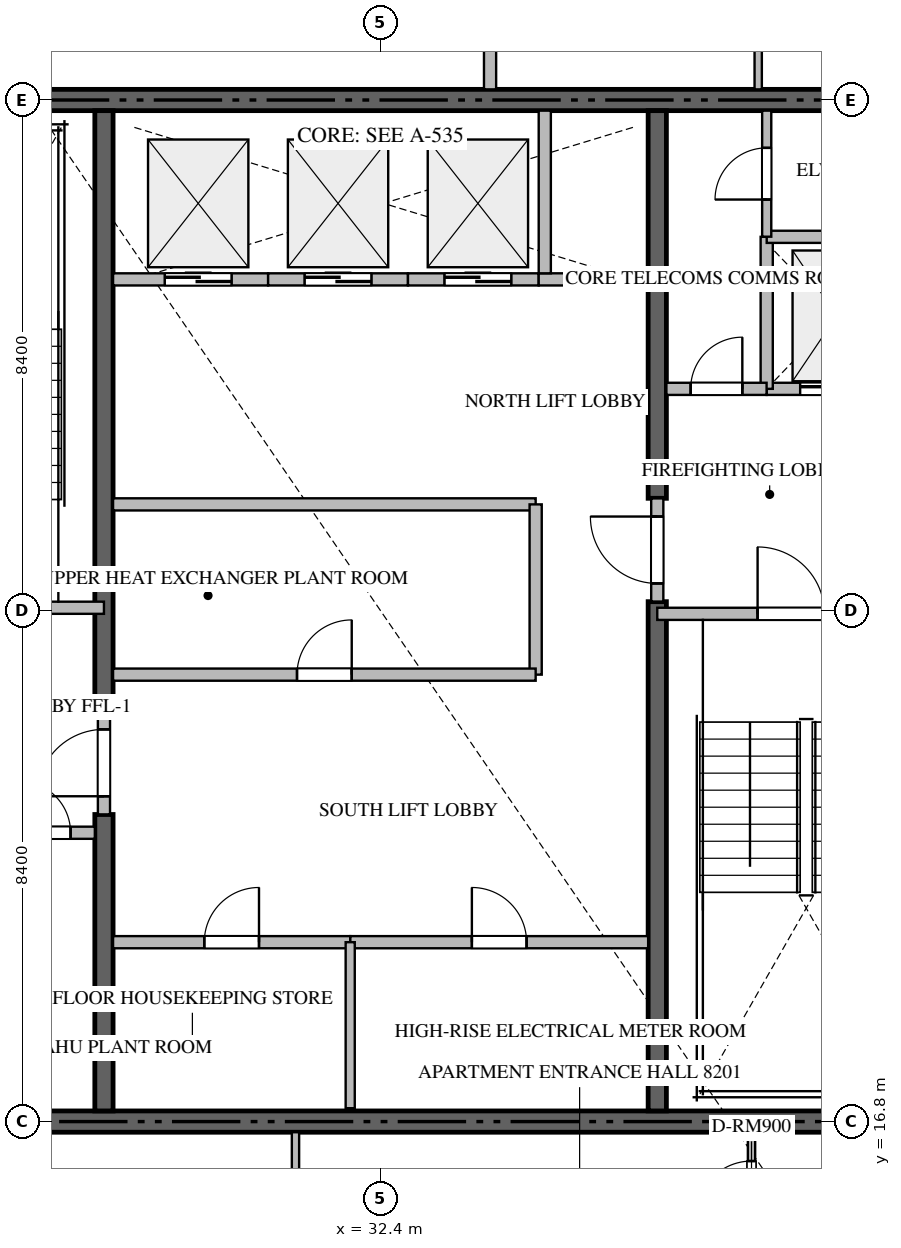
"""IFC4 building model, lengths in metres.
Left out: names, types, materials, properties, quantities, classifications, styles, units other than length and angle.
Written with IfcOpenShell. Run it as: python <this file> out.ifc"""

import sys

from ifc_helpers import new_model, si_unit, direction, frame, frame_2d, origin, place, context, subcontext, project, spatial, rectangle, extrude, source, transform, mapped, element, fill, save


model = new_model("IFC4")
c1 = context("Model", 3, precision=1e-05, world=origin(), true_north=direction((0.0, 1.0)))
c2 = subcontext(c1, "Body", "Model", "MODEL_VIEW")
j1 = project(units=[si_unit("LENGTHUNIT", "METRE"), si_unit("PLANEANGLEUNIT", "RADIAN")], contexts=[c1])
p1 = place(None, origin())
s1 = spatial("IfcSite", under=j1, at=p1, CompositionType="ELEMENT")
p2 = place(p1, origin())
s2 = spatial("IfcBuilding", under=s1, at=p2, CompositionType="ELEMENT")
p3 = place(p2, frame((0.0, 0.0, 329.9)))
s3 = spatial("IfcBuildingStorey", under=s2, at=p3, CompositionType="ELEMENT", Elevation=329.9)
for number, where, z_axis, x_axis in (
    (1, (23.4, 16.8, -0.26), (0.0, 0.0, 1.0), (1.0, 0.0, 0.0)),
    (2, (41.4, 33.6, -0.26), (0.0, 0.0, 1.0), (-1.0, 0.0, 0.0)),
):
    element("IfcWall", number, at=place(p3, frame(where, z_axis=z_axis, x_axis=x_axis)), inside=s3, PredefinedType="SHEAR", context=c2, shape_type="SweptSolid", body=[
        extrude(rectangle(XDim=18.0, YDim=0.35, at=frame_2d((9.0, 0.0))), origin(), (0.0, 0.0, 1.0), 4.048),
    ])
p4 = place(p3, frame((27.85, 16.975, -0.26), z_axis=(0.0, 0.0, 1.0), x_axis=(0.0, 1.0, 0.0)))
e3 = element("IfcWall", 3, at=p4, inside=s3, PredefinedType="SHEAR", context=c2, shape_type="SweptSolid", body=[
    extrude(rectangle(XDim=4.875, YDim=0.3, at=frame_2d((2.438, 0.0))), origin(), (0.0, 0.0, 1.0), 4.048),
])
p5 = place(p3, frame((27.85, 23.55, -0.26), z_axis=(0.0, 0.0, 1.0), x_axis=(0.0, 1.0, 0.0)))
e4 = element("IfcWall", 4, at=p5, inside=s3, PredefinedType="SHEAR", context=c2, shape_type="SweptSolid", body=[
    extrude(rectangle(XDim=9.875, YDim=0.3, at=frame_2d((4.938, 0.0))), origin(), (0.0, 0.0, 1.0), 4.048),
])
p6 = place(p3, frame((36.95, 16.975, -0.26), z_axis=(0.0, 0.0, 1.0), x_axis=(0.0, 1.0, 0.0)))
e5 = element("IfcWall", 5, at=p6, inside=s3, PredefinedType="SHEAR", context=c2, shape_type="SweptSolid", body=[
    extrude(rectangle(XDim=8.375, YDim=0.3, at=frame_2d((4.188, 0.0))), origin(), (0.0, 0.0, 1.0), 4.048),
])
p7 = place(p3, frame((36.95, 27.05, -0.26), z_axis=(0.0, 0.0, 1.0), x_axis=(0.0, 1.0, 0.0)))
e6 = element("IfcWall", 6, at=p7, inside=s3, PredefinedType="SHEAR", context=c2, shape_type="SweptSolid", body=[
    extrude(rectangle(XDim=6.375, YDim=0.3, at=frame_2d((3.188, 0.0))), origin(), (0.0, 0.0, 1.0), 4.048),
])
p8 = place(p3, frame((23.4, 25.25, 0.0), z_axis=(0.0, 0.0, 1.0), x_axis=(1.0, 0.0, 0.0)))
e7 = element("IfcWall", 7, at=p8, inside=s3, PredefinedType="STANDARD", context=c2, shape_type="SweptSolid", body=[
    extrude(rectangle(XDim=4.45, YDim=0.2, at=frame_2d((2.225, 0.0))), origin(), (0.0, 0.0, 1.0), 3.79),
])
p9 = place(p8, frame((1.65, 0.0, 0.0)))
e8 = element("IfcOpeningElement", 8, at=p9, cuts=e7, PredefinedType="OPENING", context=c2, shape_type="SweptSolid", body=[
    extrude(rectangle(XDim=1.1, YDim=2.15, at=frame_2d((0.55, 1.075))), frame((0.0, 0.11, 0.0), z_axis=(0.0, -1.0, 0.0), x_axis=(1.0, 0.0, 0.0)), (0.0, 0.0, 1.0), 0.22),
])
p10 = place(p3, frame((36.95, 25.15, 0.0), z_axis=(0.0, 0.0, 1.0), x_axis=(1.0, 0.0, 0.0)))
e9 = element("IfcWall", 9, at=p10, inside=s3, PredefinedType="STANDARD", context=c2, shape_type="SweptSolid", body=[
    extrude(rectangle(XDim=4.45, YDim=0.2, at=frame_2d((2.225, 0.0))), origin(), (0.0, 0.0, 1.0), 3.79),
])
p11 = place(p10, frame((1.65, 0.0, 0.0)))
e10 = element("IfcOpeningElement", 10, at=p11, cuts=e9, PredefinedType="OPENING", context=c2, shape_type="SweptSolid", body=[
    extrude(rectangle(XDim=1.1, YDim=2.15, at=frame_2d((0.55, 1.075))), frame((0.0, 0.11, 0.0), z_axis=(0.0, -1.0, 0.0), x_axis=(1.0, 0.0, 0.0)), (0.0, 0.0, 1.0), 0.22),
])
p12 = place(p3, frame((38.75, 28.85, 0.0), z_axis=(0.0, 0.0, 1.0), x_axis=(1.0, 0.0, 0.0)))
e11 = element("IfcWall", 11, at=p12, inside=s3, PredefinedType="STANDARD", context=c2, shape_type="SweptSolid", body=[
    extrude(rectangle(XDim=2.475, YDim=0.2, at=frame_2d((1.238, 0.0))), origin(), (0.0, 0.0, 1.0), 3.79),
])
p13 = place(p12, frame((0.55, 0.0, 0.0)))
e12 = element("IfcOpeningElement", 12, at=p13, cuts=e11, PredefinedType="OPENING", context=c2, shape_type="SweptSolid", body=[
    extrude(rectangle(XDim=1.2, YDim=2.2, at=frame_2d((0.6, 1.1))), frame((0.0, 0.11, 0.0), z_axis=(0.0, -1.0, 0.0), x_axis=(1.0, 0.0, 0.0)), (0.0, 0.0, 1.0), 0.22),
])
p14 = place(p3, frame((28.0, 30.65, 0.0), z_axis=(0.0, 0.0, 1.0), x_axis=(1.0, 0.0, 0.0)))
e13 = element("IfcWall", 13, at=p14, inside=s3, PredefinedType="STANDARD", context=c2, shape_type="SweptSolid", body=[
    extrude(rectangle(XDim=2.55, YDim=0.2, at=frame_2d((1.275, 0.0))), origin(), (0.0, 0.0, 1.0), 3.79),
])
p15 = place(p14, frame((0.85, 0.0, 0.0)))
e14 = element("IfcOpeningElement", 14, at=p15, cuts=e13, PredefinedType="OPENING", context=c2, shape_type="SweptSolid", body=[
    extrude(rectangle(XDim=1.1, YDim=2.2, at=frame_2d((0.55, 1.1))), frame((0.0, 0.11, 0.0), z_axis=(0.0, -1.0, 0.0), x_axis=(1.0, 0.0, 0.0)), (0.0, 0.0, 1.0), 0.22),
])
p16 = place(p3, frame((30.55, 30.65, 0.0), z_axis=(0.0, 0.0, 1.0), x_axis=(1.0, 0.0, 0.0)))
e15 = element("IfcWall", 15, at=p16, inside=s3, PredefinedType="STANDARD", context=c2, shape_type="SweptSolid", body=[
    extrude(rectangle(XDim=2.3, YDim=0.2, at=frame_2d((1.15, 0.0))), origin(), (0.0, 0.0, 1.0), 3.79),
])
p17 = place(p16, frame((0.6, 0.0, 0.0)))
e16 = element("IfcOpeningElement", 16, at=p17, cuts=e15, PredefinedType="OPENING", context=c2, shape_type="SweptSolid", body=[
    extrude(rectangle(XDim=1.1, YDim=2.2, at=frame_2d((0.55, 1.1))), frame((0.0, 0.11, 0.0), z_axis=(0.0, -1.0, 0.0), x_axis=(1.0, 0.0, 0.0)), (0.0, 0.0, 1.0), 0.22),
])
p18 = place(p3, frame((32.85, 30.65, 0.0), z_axis=(0.0, 0.0, 1.0), x_axis=(1.0, 0.0, 0.0)))
e17 = element("IfcWall", 17, at=p18, inside=s3, PredefinedType="STANDARD", context=c2, shape_type="SweptSolid", body=[
    extrude(rectangle(XDim=2.15, YDim=0.2, at=frame_2d((1.075, 0.0))), origin(), (0.0, 0.0, 1.0), 3.79),
])
p19 = place(p18, frame((0.6, 0.0, 0.0)))
e18 = element("IfcOpeningElement", 18, at=p19, cuts=e17, PredefinedType="OPENING", context=c2, shape_type="SweptSolid", body=[
    extrude(rectangle(XDim=1.1, YDim=2.2, at=frame_2d((0.55, 1.1))), frame((0.0, 0.11, 0.0), z_axis=(0.0, -1.0, 0.0), x_axis=(1.0, 0.0, 0.0)), (0.0, 0.0, 1.0), 0.22),
])
p20 = place(p3, frame((35.0, 30.65, 0.0), z_axis=(0.0, 0.0, 1.0), x_axis=(1.0, 0.0, 0.0)))
e19 = element("IfcWall", 19, at=p20, inside=s3, PredefinedType="STANDARD", context=c2, shape_type="SweptSolid", body=[
    extrude(rectangle(XDim=1.8, YDim=0.2, at=frame_2d((0.9, 0.0))), origin(), (0.0, 0.0, 1.0), 3.79),
])
p21 = place(p3, frame((35.1, 30.75, 0.0), z_axis=(0.0, 0.0, 1.0), x_axis=(0.0, 1.0, 0.0)))
e20 = element("IfcWall", 20, at=p21, inside=s3, PredefinedType="STANDARD", context=c2, shape_type="SweptSolid", body=[
    extrude(rectangle(XDim=2.675, YDim=0.2, at=frame_2d((1.337, 0.0))), origin(), (0.0, 0.0, 1.0), 3.79),
])
p22 = place(p3, frame((26.052, 21.55, 0.0), z_axis=(0.0, 0.0, 1.0), x_axis=(1.0, 0.0, 0.0)))
e21 = element("IfcWall", 21, at=p22, inside=s3, PredefinedType="STANDARD", context=c2, shape_type="SweptSolid", body=[
    extrude(rectangle(XDim=1.648, YDim=0.2, at=frame_2d((0.824, 0.0))), origin(), (0.0, 0.0, 1.0), 3.79),
])
p23 = place(p22, frame((0.399, 0.0, 0.0)))
e22 = element("IfcOpeningElement", 22, at=p23, cuts=e21, PredefinedType="OPENING", context=c2, shape_type="SweptSolid", body=[
    extrude(rectangle(XDim=0.85, YDim=2.1, at=frame_2d((0.425, 1.05))), frame((0.0, 0.11, 0.0), z_axis=(0.0, -1.0, 0.0), x_axis=(1.0, 0.0, 0.0)), (0.0, 0.0, 1.0), 0.22),
])
p24 = place(p3, frame((38.75, 28.85, 0.0), z_axis=(0.0, 0.0, 1.0), x_axis=(0.0, 1.0, 0.0)))
e23 = element("IfcWall", 23, at=p24, inside=s3, PredefinedType="STANDARD", context=c2, shape_type="SweptSolid", body=[
    extrude(rectangle(XDim=2.5, YDim=0.2, at=frame_2d((1.25, 0.0))), origin(), (0.0, 0.0, 1.0), 3.79),
])
p25 = place(p3, frame((38.75, 31.35, 0.0), z_axis=(0.0, 0.0, 1.0), x_axis=(1.0, 0.0, 0.0)))
e24 = element("IfcWall", 24, at=p25, inside=s3, PredefinedType="STANDARD", context=c2, shape_type="SweptSolid", body=[
    extrude(rectangle(XDim=2.475, YDim=0.2, at=frame_2d((1.238, 0.0))), origin(), (0.0, 0.0, 1.0), 3.79),
])
p26 = place(p3, frame((37.1, 28.85, 0.0), z_axis=(0.0, 0.0, 1.0), x_axis=(1.0, 0.0, 0.0)))
e25 = element("IfcWall", 25, at=p26, inside=s3, PredefinedType="STANDARD", context=c2, shape_type="SweptSolid", body=[
    extrude(rectangle(XDim=1.648, YDim=0.2, at=frame_2d((0.824, 0.0))), origin(), (0.0, 0.0, 1.0), 3.79),
])
p27 = place(p26, frame((0.399, 0.0, 0.0)))
e26 = element("IfcOpeningElement", 26, at=p27, cuts=e25, PredefinedType="OPENING", context=c2, shape_type="SweptSolid", body=[
    extrude(rectangle(XDim=0.85, YDim=2.1, at=frame_2d((0.425, 1.05))), frame((0.0, 0.11, 0.0), z_axis=(0.0, -1.0, 0.0), x_axis=(1.0, 0.0, 0.0)), (0.0, 0.0, 1.0), 0.22),
])
p28 = place(p3, frame((27.85, 21.852, 0.0), z_axis=(0.0, 0.0, 1.0), x_axis=(0.0, 1.0, 0.0)))
e27 = element("IfcWall", 27, at=p28, inside=s3, PredefinedType="STANDARD", context=c2, shape_type="SweptSolid", body=[
    extrude(rectangle(XDim=1.696, YDim=0.2, at=frame_2d((0.848, 0.0))), origin(), (0.0, 0.0, 1.0), 3.79),
])
p29 = place(p28, frame((0.298, 0.0, 0.0)))
e28 = element("IfcOpeningElement", 28, at=p29, cuts=e27, PredefinedType="OPENING", context=c2, shape_type="SweptSolid", body=[
    extrude(rectangle(XDim=1.1, YDim=2.15, at=frame_2d((0.55, 1.075))), frame((0.0, 0.11, 0.0), z_axis=(0.0, -1.0, 0.0), x_axis=(1.0, 0.0, 0.0)), (0.0, 0.0, 1.0), 0.22),
])
p30 = place(p3, frame((36.95, 25.352, 0.0), z_axis=(0.0, 0.0, 1.0), x_axis=(0.0, 1.0, 0.0)))
e29 = element("IfcWall", 29, at=p30, inside=s3, PredefinedType="STANDARD", context=c2, shape_type="SweptSolid", body=[
    extrude(rectangle(XDim=1.696, YDim=0.2, at=frame_2d((0.848, 0.0))), origin(), (0.0, 0.0, 1.0), 3.79),
])
p31 = place(p30, frame((0.298, 0.0, 0.0)))
e30 = element("IfcOpeningElement", 30, at=p31, cuts=e29, PredefinedType="OPENING", context=c2, shape_type="SweptSolid", body=[
    extrude(rectangle(XDim=1.1, YDim=2.15, at=frame_2d((0.55, 1.075))), frame((0.0, 0.11, 0.0), z_axis=(0.0, -1.0, 0.0), x_axis=(1.0, 0.0, 0.0)), (0.0, 0.0, 1.0), 0.22),
])
p32 = place(p3, frame((38.75, 31.352, 0.0), z_axis=(0.0, 0.0, 1.0), x_axis=(0.0, 1.0, 0.0)))
e31 = element("IfcWall", 31, at=p32, inside=s3, PredefinedType="PARTITIONING", context=c2, shape_type="SweptSolid", body=[
    extrude(rectangle(XDim=2.073, YDim=0.15, at=frame_2d((1.037, 0.0))), origin(), (0.0, 0.0, 1.0), 3.79),
])
p33 = place(p32, frame((0.611, 0.0, 0.0)))
e32 = element("IfcOpeningElement", 32, at=p33, cuts=e31, PredefinedType="OPENING", context=c2, shape_type="SweptSolid", body=[
    extrude(rectangle(XDim=0.85, YDim=2.1, at=frame_2d((0.425, 1.05))), frame((0.0, 0.085, 0.0), z_axis=(0.0, -1.0, 0.0), x_axis=(1.0, 0.0, 0.0)), (0.0, 0.0, 1.0), 0.17),
])
p34 = place(p3, frame((28.0, 19.75, 0.0), z_axis=(0.0, 0.0, 1.0), x_axis=(1.0, 0.0, 0.0)))
e33 = element("IfcWall", 33, at=p34, inside=s3, PredefinedType="STANDARD", context=c2, shape_type="SweptSolid", body=[
    extrude(rectangle(XDim=3.9, YDim=0.2, at=frame_2d((1.95, 0.0))), origin(), (0.0, 0.0, 1.0), 3.79),
])
p35 = place(p34, frame((1.5, 0.0, 0.0)))
e34 = element("IfcOpeningElement", 34, at=p35, cuts=e33, PredefinedType="OPENING", context=c2, shape_type="SweptSolid", body=[
    extrude(rectangle(XDim=0.9, YDim=2.1, at=frame_2d((0.45, 1.05))), frame((0.0, 0.11, 0.0), z_axis=(0.0, -1.0, 0.0), x_axis=(1.0, 0.0, 0.0)), (0.0, 0.0, 1.0), 0.22),
])
p36 = place(p3, frame((31.902, 19.75, 0.0), z_axis=(0.0, 0.0, 1.0), x_axis=(1.0, 0.0, 0.0)))
e35 = element("IfcWall", 35, at=p36, inside=s3, PredefinedType="STANDARD", context=c2, shape_type="SweptSolid", body=[
    extrude(rectangle(XDim=4.898, YDim=0.2, at=frame_2d((2.449, 0.0))), origin(), (0.0, 0.0, 1.0), 3.79),
])
p37 = place(p36, frame((1.999, 0.0, 0.0)))
e36 = element("IfcOpeningElement", 36, at=p37, cuts=e35, PredefinedType="OPENING", context=c2, shape_type="SweptSolid", body=[
    extrude(rectangle(XDim=0.9, YDim=2.1, at=frame_2d((0.45, 1.05))), frame((0.0, 0.11, 0.0), z_axis=(0.0, -1.0, 0.0), x_axis=(1.0, 0.0, 0.0)), (0.0, 0.0, 1.0), 0.22),
])
p38 = place(p3, frame((31.9, 17.02, 0.0), z_axis=(0.0, 0.0, 1.0), x_axis=(0.0, 1.0, 0.0)))
e37 = element("IfcWall", 37, at=p38, inside=s3, PredefinedType="PARTITIONING", context=c2, shape_type="SweptSolid", body=[
    extrude(rectangle(XDim=2.73, YDim=0.15, at=frame_2d((1.365, 0.0))), origin(), (0.0, 0.0, 1.0), 3.79),
])
p39 = place(p3, frame((28.0, 26.95, 0.0), z_axis=(0.0, 0.0, 1.0), x_axis=(1.0, 0.0, 0.0)))
e38 = element("IfcWall", 38, at=p39, inside=s3, PredefinedType="STANDARD", context=c2, shape_type="SweptSolid", body=[
    extrude(rectangle(XDim=6.95, YDim=0.2, at=frame_2d((3.475, 0.0))), origin(), (0.0, 0.0, 1.0), 3.79),
])
p40 = place(p3, frame((34.95, 24.15, 0.0), z_axis=(0.0, 0.0, 1.0), x_axis=(0.0, 1.0, 0.0)))
e39 = element("IfcWall", 39, at=p40, inside=s3, PredefinedType="STANDARD", context=c2, shape_type="SweptSolid", body=[
    extrude(rectangle(XDim=2.8, YDim=0.2, at=frame_2d((1.4, 0.0))), origin(), (0.0, 0.0, 1.0), 3.79),
])
p41 = place(p3, frame((28.0, 24.15, 0.0), z_axis=(0.0, 0.0, 1.0), x_axis=(1.0, 0.0, 0.0)))
e40 = element("IfcWall", 40, at=p41, inside=s3, PredefinedType="STANDARD", context=c2, shape_type="SweptSolid", body=[
    extrude(rectangle(XDim=6.95, YDim=0.2, at=frame_2d((3.475, 0.0))), origin(), (0.0, 0.0, 1.0), 3.79),
])
p42 = place(p41, frame((3.025, 0.0, 0.0)))
e41 = element("IfcOpeningElement", 41, at=p42, cuts=e40, PredefinedType="OPENING", context=c2, shape_type="SweptSolid", body=[
    extrude(rectangle(XDim=0.9, YDim=2.1, at=frame_2d((0.45, 1.05))), frame((0.0, 0.11, 0.0), z_axis=(0.0, -1.0, 0.0), x_axis=(1.0, 0.0, 0.0)), (0.0, 0.0, 1.0), 0.22),
])
p43 = place(p3, frame((34.2, 33.775, 0.0), z_axis=(0.0, 0.0, 1.0), x_axis=(0.0, 1.0, 0.0)))
e42 = element("IfcWall", 42, at=p43, inside=s3, PredefinedType="PARTITIONING", context=c2, shape_type="SweptSolid", body=[
    extrude(rectangle(XDim=14.143, YDim=0.2, at=frame_2d((7.072, 0.0))), origin(), (0.0, 0.0, 1.0), 3.79),
])
p44 = place(p3, frame((38.5, 14.65, 0.0), z_axis=(0.0, 0.0, 1.0), x_axis=(0.0, 1.0, 0.0)))
e43 = element("IfcWall", 43, at=p44, inside=s3, PredefinedType="PARTITIONING", context=c2, shape_type="SweptSolid", body=[
    extrude(rectangle(XDim=1.975, YDim=0.12, at=frame_2d((0.988, 0.0))), origin(), (0.0, 0.0, 1.0), 3.79),
])
p45 = place(p44, frame((0.601, 0.0, 0.0)))
e44 = element("IfcOpeningElement", 44, at=p45, cuts=e43, PredefinedType="OPENING", context=c2, shape_type="SweptSolid", body=[
    extrude(rectangle(XDim=0.9, YDim=2.1, at=frame_2d((0.45, 1.05))), frame((0.0, 0.07, 0.0), z_axis=(0.0, -1.0, 0.0), x_axis=(1.0, 0.0, 0.0)), (0.0, 0.0, 1.0), 0.14),
])
p46 = place(p3, frame((31.0, 14.652, 0.0), z_axis=(0.0, 0.0, 1.0), x_axis=(0.0, 1.0, 0.0)))
e45 = element("IfcWall", 45, at=p46, inside=s3, PredefinedType="PARTITIONING", context=c2, shape_type="SweptSolid", body=[
    extrude(rectangle(XDim=1.973, YDim=0.12, at=frame_2d((0.986, 0.0))), origin(), (0.0, 0.0, 1.0), 3.79),
])
p47 = place(p3, frame((38.61, 38.324, 0.0), z_axis=(0.0, 0.0, 1.0), x_axis=(0.0, -1.0, 0.0)))
e46 = element("IfcWall", 46, at=p47, inside=s3, PredefinedType="PARTITIONING", context=c2, shape_type="SweptSolid", body=[
    extrude(rectangle(XDim=4.549, YDim=0.12, at=frame_2d((2.274, 0.0))), origin(), (0.0, 0.0, 1.0), 3.79),
])
p48 = place(p47, frame((2.364, 0.0, 0.0)))
e47 = element("IfcOpeningElement", 47, at=p48, cuts=e46, PredefinedType="OPENING", context=c2, shape_type="SweptSolid", body=[
    extrude(rectangle(XDim=0.85, YDim=2.1, at=frame_2d((0.425, 1.05))), frame((0.0, 0.07, 0.0), z_axis=(0.0, -1.0, 0.0), x_axis=(1.0, 0.0, 0.0)), (0.0, 0.0, 1.0), 0.14),
])
m1 = source(origin(), c2, "Body", "SweptSolid", [
    extrude(rectangle(XDim=1.1, YDim=2.15, at=frame_2d((0.55, 1.075))), frame((0.0, 0.025, 0.0), z_axis=(0.0, -1.0, 0.0), x_axis=(1.0, 0.0, 0.0)), (0.0, 0.0, 1.0), 0.05),
])
p49 = place(p11, origin())
e48 = element("IfcDoor", 48, at=p49, inside=s3, OperationType="SINGLE_SWING_LEFT", PredefinedType="DOOR", context=c2, shape_type="MappedRepresentation", body=[
    mapped(m1, transform((0.0, 0.0, 0.0), scale=1.0)),
])
fill(e10, e48)
m2 = source(origin(), c2, "Body", "SweptSolid", [
    extrude(rectangle(XDim=1.2, YDim=2.2, at=frame_2d((0.6, 1.1))), frame((0.0, 0.025, 0.0), z_axis=(0.0, -1.0, 0.0), x_axis=(1.0, 0.0, 0.0)), (0.0, 0.0, 1.0), 0.05),
])
p50 = place(p13, origin())
e49 = element("IfcDoor", 49, at=p50, inside=s3, OperationType="DOUBLE_DOOR_SLIDING", PredefinedType="DOOR", context=c2, shape_type="MappedRepresentation", body=[
    mapped(m2, transform((0.0, 0.0, 0.0), scale=1.0)),
])
fill(e12, e49)
m3 = source(origin(), c2, "Body", "SweptSolid", [
    extrude(rectangle(XDim=1.1, YDim=2.2, at=frame_2d((0.55, 1.1))), frame((0.0, 0.025, 0.0), z_axis=(0.0, -1.0, 0.0), x_axis=(1.0, 0.0, 0.0)), (0.0, 0.0, 1.0), 0.05),
])
p51 = place(p15, origin())
e50 = element("IfcDoor", 50, at=p51, inside=s3, OperationType="DOUBLE_DOOR_SLIDING", PredefinedType="DOOR", context=c2, shape_type="MappedRepresentation", body=[
    mapped(m3, transform((0.0, 0.0, 0.0), scale=1.0)),
])
fill(e14, e50)
p52 = place(p17, origin())
e51 = element("IfcDoor", 51, at=p52, inside=s3, OperationType="DOUBLE_DOOR_SLIDING", PredefinedType="DOOR", context=c2, shape_type="MappedRepresentation", body=[
    mapped(m3, transform((0.0, 0.0, 0.0), scale=1.0)),
])
fill(e16, e51)
p53 = place(p19, origin())
e52 = element("IfcDoor", 52, at=p53, inside=s3, OperationType="DOUBLE_DOOR_SLIDING", PredefinedType="DOOR", context=c2, shape_type="MappedRepresentation", body=[
    mapped(m3, transform((0.0, 0.0, 0.0), scale=1.0)),
])
fill(e18, e52)
m4 = source(origin(), c2, "Body", "SweptSolid", [
    extrude(rectangle(XDim=0.85, YDim=2.1, at=frame_2d((0.425, 1.05))), frame((0.0, 0.025, 0.0), z_axis=(0.0, -1.0, 0.0), x_axis=(1.0, 0.0, 0.0)), (0.0, 0.0, 1.0), 0.05),
])
p54 = place(p23, origin())
e53 = element("IfcDoor", 53, at=p54, inside=s3, OperationType="SINGLE_SWING_LEFT", PredefinedType="DOOR", context=c2, shape_type="MappedRepresentation", body=[
    mapped(m4, transform((0.0, 0.0, 0.0), scale=1.0)),
])
fill(e22, e53)
p55 = place(p27, origin())
e54 = element("IfcDoor", 54, at=p55, inside=s3, OperationType="SINGLE_SWING_RIGHT", PredefinedType="DOOR", context=c2, shape_type="MappedRepresentation", body=[
    mapped(m4, transform((0.0, 0.0, 0.0), scale=1.0)),
])
fill(e26, e54)
p56 = place(p29, origin())
e55 = element("IfcDoor", 55, at=p56, inside=s3, OperationType="SINGLE_SWING_LEFT", PredefinedType="DOOR", context=c2, shape_type="MappedRepresentation", body=[
    mapped(m1, transform((0.0, 0.0, 0.0), scale=1.0)),
])
fill(e28, e55)
p57 = place(p31, origin())
e56 = element("IfcDoor", 56, at=p57, inside=s3, OperationType="SINGLE_SWING_RIGHT", PredefinedType="DOOR", context=c2, shape_type="MappedRepresentation", body=[
    mapped(m1, transform((0.0, 0.0, 0.0), scale=1.0)),
])
fill(e30, e56)
p58 = place(p33, origin())
e57 = element("IfcDoor", 57, at=p58, inside=s3, OperationType="SINGLE_SWING_LEFT", PredefinedType="DOOR", context=c2, shape_type="MappedRepresentation", body=[
    mapped(m4, transform((0.0, 0.0, 0.0), scale=1.0)),
])
fill(e32, e57)
m5 = source(origin(), c2, "Body", "SweptSolid", [
    extrude(rectangle(XDim=0.9, YDim=2.1, at=frame_2d((0.45, 1.05))), frame((0.0, 0.025, 0.0), z_axis=(0.0, -1.0, 0.0), x_axis=(1.0, 0.0, 0.0)), (0.0, 0.0, 1.0), 0.05),
])
p59 = place(p35, origin())
e58 = element("IfcDoor", 58, at=p59, inside=s3, OperationType="SINGLE_SWING_RIGHT", PredefinedType="DOOR", context=c2, shape_type="MappedRepresentation", body=[
    mapped(m5, transform((0.0, 0.0, 0.0), scale=1.0)),
])
fill(e34, e58)
p60 = place(p37, origin())
e59 = element("IfcDoor", 59, at=p60, inside=s3, OperationType="SINGLE_SWING_LEFT", PredefinedType="DOOR", context=c2, shape_type="MappedRepresentation", body=[
    mapped(m5, transform((0.0, 0.0, 0.0), scale=1.0)),
])
fill(e36, e59)
p61 = place(p42, origin())
e60 = element("IfcDoor", 60, at=p61, inside=s3, OperationType="SINGLE_SWING_RIGHT", PredefinedType="DOOR", context=c2, shape_type="MappedRepresentation", body=[
    mapped(m5, transform((0.0, 0.0, 0.0), scale=1.0)),
])
fill(e41, e60)
p62 = place(p45, origin())
e61 = element("IfcDoor", 61, at=p62, inside=s3, OperationType="SINGLE_SWING_LEFT", PredefinedType="DOOR", context=c2, shape_type="MappedRepresentation", body=[
    mapped(m5, transform((0.0, 0.0, 0.0), scale=1.0)),
])
fill(e44, e61)
save(model, sys.argv[1])
